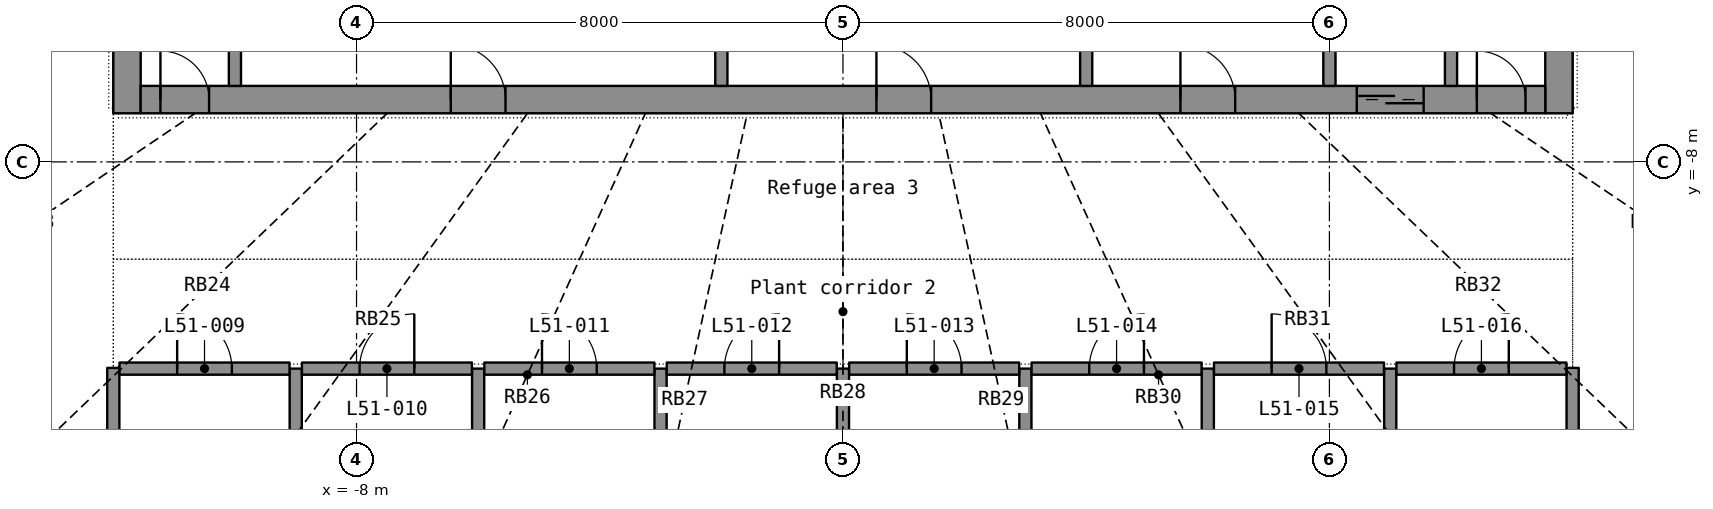
"""IFC4 building model, lengths in metres.
Left out: names, types, materials, properties, quantities, classifications, styles, units other than length and angle.
Written with IfcOpenShell. Run it as: python <this file> out.ifc"""

import sys

from ifc_helpers import new_model, si_unit, direction, frame, frame_2d, origin, place, context, subcontext, project, spatial, rectangle, extrude, element, fill, save


model = new_model("IFC4")
c1 = context("Model", 3, precision=1e-05, world=origin(), true_north=direction((0.0, 1.0)))
c2 = subcontext(c1, "Body", "Model", "MODEL_VIEW")
j1 = project(units=[si_unit("LENGTHUNIT", "METRE"), si_unit("PLANEANGLEUNIT", "RADIAN")], contexts=[c1])
p1 = place(None, origin())
s1 = spatial("IfcSite", under=j1, at=p1, CompositionType="ELEMENT")
p2 = place(p1, origin())
s2 = spatial("IfcBuilding", under=s1, at=p2, CompositionType="ELEMENT")
p3 = place(p2, frame((0.0, 0.0, 212.6)))
s3 = spatial("IfcBuildingStorey", under=s2, at=p3, CompositionType="ELEMENT", Elevation=212.6)
p4 = place(p3, frame((-11.775, -7.2, 0.0), z_axis=(0.0, 0.0, 1.0), x_axis=(0.0, 1.0, 0.0)))
e1 = element("IfcWall", 1, at=p4, inside=s3, PredefinedType="SHEAR", context=c2, shape_type="SweptSolid", body=[
    extrude(rectangle(XDim=14.4, YDim=0.45, at=frame_2d((7.2, 0.0))), origin(), (0.0, 0.0, 1.0), 4.1),
])
p5 = place(p4, frame((6.5, 0.0, 0.0)))
e2 = element("IfcOpeningElement", 2, at=p5, cuts=e1, PredefinedType="OPENING", context=c2, shape_type="SweptSolid", body=[
    extrude(rectangle(XDim=1.4, YDim=2.2, at=frame_2d((0.7, 1.1))), frame((0.0, 0.235, 0.0), z_axis=(0.0, -1.0, 0.0), x_axis=(1.0, 0.0, 0.0)), (0.0, 0.0, 1.0), 0.47),
])
p6 = place(p3, frame((11.775, -7.2, 0.0), z_axis=(0.0, 0.0, 1.0), x_axis=(0.0, 1.0, 0.0)))
e3 = element("IfcWall", 3, at=p6, inside=s3, PredefinedType="SHEAR", context=c2, shape_type="SweptSolid", body=[
    extrude(rectangle(XDim=14.4, YDim=0.45, at=frame_2d((7.2, 0.0))), origin(), (0.0, 0.0, 1.0), 4.1),
])
p7 = place(p6, frame((6.5, 0.0, 0.0)))
e4 = element("IfcOpeningElement", 4, at=p7, cuts=e3, PredefinedType="OPENING", context=c2, shape_type="SweptSolid", body=[
    extrude(rectangle(XDim=1.4, YDim=2.2, at=frame_2d((0.7, 1.1))), frame((0.0, 0.235, 0.0), z_axis=(0.0, -1.0, 0.0), x_axis=(1.0, 0.0, 0.0)), (0.0, 0.0, 1.0), 0.47),
])
p8 = place(p3, frame((-11.55, -6.975, 0.0), z_axis=(0.0, 0.0, 1.0), x_axis=(1.0, 0.0, 0.0)))
e5 = element("IfcWall", 5, at=p8, inside=s3, PredefinedType="SHEAR", context=c2, shape_type="SweptSolid", body=[
    extrude(rectangle(XDim=23.1, YDim=0.45, at=frame_2d((11.55, 0.0))), origin(), (0.0, 0.0, 1.0), 4.1),
])
p9 = place(p8, frame((20.0, 0.0, 0.0)))
e6 = element("IfcOpeningElement", 6, at=p9, cuts=e5, PredefinedType="OPENING", context=c2, shape_type="SweptSolid", body=[
    extrude(rectangle(XDim=1.1, YDim=2.2, at=frame_2d((0.55, 1.1))), frame((0.0, 0.235, 0.0), z_axis=(0.0, -1.0, 0.0), x_axis=(1.0, 0.0, 0.0)), (0.0, 0.0, 1.0), 0.47),
])
p10 = place(p8, frame((5.1, 0.0, 0.0)))
e7 = element("IfcOpeningElement", 7, at=p10, cuts=e5, PredefinedType="OPENING", context=c2, shape_type="SweptSolid", body=[
    extrude(rectangle(XDim=0.9, YDim=2.1, at=frame_2d((0.45, 1.05))), frame((0.0, 0.235, 0.0), z_axis=(0.0, -1.0, 0.0), x_axis=(1.0, 0.0, 0.0)), (0.0, 0.0, 1.0), 0.47),
])
p11 = place(p8, frame((12.1, 0.0, 0.0)))
e8 = element("IfcOpeningElement", 8, at=p11, cuts=e5, PredefinedType="OPENING", context=c2, shape_type="SweptSolid", body=[
    extrude(rectangle(XDim=0.9, YDim=2.1, at=frame_2d((0.45, 1.05))), frame((0.0, 0.235, 0.0), z_axis=(0.0, -1.0, 0.0), x_axis=(1.0, 0.0, 0.0)), (0.0, 0.0, 1.0), 0.47),
])
p12 = place(p8, frame((17.1, 0.0, 0.0)))
e9 = element("IfcOpeningElement", 9, at=p12, cuts=e5, PredefinedType="OPENING", context=c2, shape_type="SweptSolid", body=[
    extrude(rectangle(XDim=0.9, YDim=2.1, at=frame_2d((0.45, 1.05))), frame((0.0, 0.235, 0.0), z_axis=(0.0, -1.0, 0.0), x_axis=(1.0, 0.0, 0.0)), (0.0, 0.0, 1.0), 0.47),
])
p13 = place(p8, frame((0.325, 0.0, 0.0)))
e10 = element("IfcOpeningElement", 10, at=p13, cuts=e5, PredefinedType="OPENING", context=c2, shape_type="SweptSolid", body=[
    extrude(rectangle(XDim=0.8, YDim=2.05, at=frame_2d((0.4, 1.025))), frame((0.0, 0.235, 0.0), z_axis=(0.0, -1.0, 0.0), x_axis=(1.0, 0.0, 0.0)), (0.0, 0.0, 1.0), 0.47),
])
p14 = place(p8, frame((21.975, 0.0, 0.0)))
e11 = element("IfcOpeningElement", 11, at=p14, cuts=e5, PredefinedType="OPENING", context=c2, shape_type="SweptSolid", body=[
    extrude(rectangle(XDim=0.8, YDim=2.05, at=frame_2d((0.4, 1.025))), frame((0.0, 0.235, 0.0), z_axis=(0.0, -1.0, 0.0), x_axis=(1.0, 0.0, 0.0)), (0.0, 0.0, 1.0), 0.47),
])
for number, where, z_axis, x_axis in (
    (12, (-10.0, -6.75, 0.0), (0.0, 0.0, 1.0), (0.0, 1.0, 0.0)),
    (13, (8.0, -6.75, 0.0), (0.0, 0.0, 1.0), (0.0, 1.0, 0.0)),
    (14, (10.0, -6.75, 0.0), (0.0, 0.0, 1.0), (0.0, 1.0, 0.0)),
):
    element("IfcWall", number, at=place(p3, frame(where, z_axis=z_axis, x_axis=x_axis)), inside=s3, PredefinedType="SHEAR", context=c2, shape_type="SweptSolid", body=[
        extrude(rectangle(XDim=2.85, YDim=0.2, at=frame_2d((1.425, 0.0))), origin(), (0.0, 0.0, 1.0), 4.1),
    ])
for number, where, z_axis, x_axis in (
    (15, (-2.0, -6.75, 0.0), (0.0, 0.0, 1.0), (0.0, 1.0, 0.0)),
    (16, (4.0, -6.75, 0.0), (0.0, 0.0, 1.0), (0.0, 1.0, 0.0)),
):
    element("IfcWall", number, at=place(p3, frame(where, z_axis=z_axis, x_axis=x_axis)), inside=s3, PredefinedType="PARTITIONING", context=c2, shape_type="SweptSolid", body=[
        extrude(rectangle(XDim=2.85, YDim=0.2, at=frame_2d((1.425, 0.0))), origin(), (0.0, 0.0, 1.0), 4.1),
    ])
p15 = place(p3, frame((0.0, -18.107, 0.0), z_axis=(0.0, 0.0, 1.0), x_axis=(0.0, 1.0, 0.0)))
e17 = element("IfcWall", 17, at=p15, inside=s3, PredefinedType="PARTITIONING", context=c2, shape_type="SweptSolid", body=[
    extrude(rectangle(XDim=6.708, YDim=0.2, at=frame_2d((3.354, 0.0))), origin(), (0.0, 0.0, 1.0), 3.3),
])
for number, where, z_axis, x_axis in (
    (18, (-3.0, -17.784, 0.0), (0.0, 0.0, 1.0), (0.0, 1.0, 0.0)),
    (19, (3.0, -17.784, 0.0), (0.0, 0.0, 1.0), (0.0, 1.0, 0.0)),
):
    element("IfcWall", number, at=place(p3, frame(where, z_axis=z_axis, x_axis=x_axis)), inside=s3, PredefinedType="PARTITIONING", context=c2, shape_type="SweptSolid", body=[
        extrude(rectangle(XDim=6.384, YDim=0.2, at=frame_2d((3.192, 0.0))), origin(), (0.0, 0.0, 1.0), 3.3),
    ])
for number, where, z_axis, x_axis in (
    (20, (-6.0, -17.398, 0.0), (0.0, 0.0, 1.0), (0.0, 1.0, 0.0)),
    (21, (6.0, -17.398, 0.0), (0.0, 0.0, 1.0), (0.0, 1.0, 0.0)),
):
    element("IfcWall", number, at=place(p3, frame(where, z_axis=z_axis, x_axis=x_axis)), inside=s3, PredefinedType="PARTITIONING", context=c2, shape_type="SweptSolid", body=[
        extrude(rectangle(XDim=5.999, YDim=0.2, at=frame_2d((2.999, 0.0))), origin(), (0.0, 0.0, 1.0), 3.3),
    ])
for number, where, z_axis, x_axis in (
    (22, (-9.0, -16.381, 0.0), (0.0, 0.0, 1.0), (0.0, 1.0, 0.0)),
    (23, (9.0, -16.381, 0.0), (0.0, 0.0, 1.0), (0.0, 1.0, 0.0)),
):
    element("IfcWall", number, at=place(p3, frame(where, z_axis=z_axis, x_axis=x_axis)), inside=s3, PredefinedType="PARTITIONING", context=c2, shape_type="SweptSolid", body=[
        extrude(rectangle(XDim=4.981, YDim=0.2, at=frame_2d((2.49, 0.0))), origin(), (0.0, 0.0, 1.0), 3.3),
    ])
for number, where, z_axis, x_axis in (
    (24, (-12.0, -11.388, 0.0), (0.0, 0.0, 1.0), (0.0, -1.0, 0.0)),
    (25, (12.0, -15.095, 0.0), (0.0, 0.0, 1.0), (0.0, 1.0, 0.0)),
):
    element("IfcWall", number, at=place(p3, frame(where, z_axis=z_axis, x_axis=x_axis)), inside=s3, PredefinedType="PARTITIONING", context=c2, shape_type="SweptSolid", body=[
        extrude(rectangle(XDim=3.707, YDim=0.2, at=frame_2d((1.854, 0.0))), origin(), (0.0, 0.0, 1.0), 3.3),
    ])
p16 = place(p3, frame((-11.898, -11.4, 0.0), z_axis=(0.0, 0.0, 1.0), x_axis=(1.0, 0.0, 0.0)))
e26 = element("IfcWall", 26, at=p16, inside=s3, PredefinedType="PARTITIONING", context=c2, shape_type="SweptSolid", body=[
    extrude(rectangle(XDim=2.796, YDim=0.2, at=frame_2d((1.398, 0.0))), origin(), (0.0, 0.0, 1.0), 3.3),
])
p17 = place(p16, frame((0.948, 0.0, 0.0)))
e27 = element("IfcOpeningElement", 27, at=p17, cuts=e26, PredefinedType="OPENING", context=c2, shape_type="SweptSolid", body=[
    extrude(rectangle(XDim=0.9, YDim=2.1, at=frame_2d((0.45, 1.05))), frame((0.0, 0.11, 0.0), z_axis=(0.0, -1.0, 0.0), x_axis=(1.0, 0.0, 0.0)), (0.0, 0.0, 1.0), 0.22),
])
p18 = place(p3, frame((-8.898, -11.4, 0.0), z_axis=(0.0, 0.0, 1.0), x_axis=(1.0, 0.0, 0.0)))
e28 = element("IfcWall", 28, at=p18, inside=s3, PredefinedType="PARTITIONING", context=c2, shape_type="SweptSolid", body=[
    extrude(rectangle(XDim=2.796, YDim=0.2, at=frame_2d((1.398, 0.0))), origin(), (0.0, 0.0, 1.0), 3.3),
])
p19 = place(p18, frame((0.948, 0.0, 0.0)))
e29 = element("IfcOpeningElement", 29, at=p19, cuts=e28, PredefinedType="OPENING", context=c2, shape_type="SweptSolid", body=[
    extrude(rectangle(XDim=0.9, YDim=2.1, at=frame_2d((0.45, 1.05))), frame((0.0, 0.11, 0.0), z_axis=(0.0, -1.0, 0.0), x_axis=(1.0, 0.0, 0.0)), (0.0, 0.0, 1.0), 0.22),
])
p20 = place(p3, frame((-5.898, -11.4, 0.0), z_axis=(0.0, 0.0, 1.0), x_axis=(1.0, 0.0, 0.0)))
e30 = element("IfcWall", 30, at=p20, inside=s3, PredefinedType="PARTITIONING", context=c2, shape_type="SweptSolid", body=[
    extrude(rectangle(XDim=2.796, YDim=0.2, at=frame_2d((1.398, 0.0))), origin(), (0.0, 0.0, 1.0), 3.3),
])
p21 = place(p20, frame((0.948, 0.0, 0.0)))
e31 = element("IfcOpeningElement", 31, at=p21, cuts=e30, PredefinedType="OPENING", context=c2, shape_type="SweptSolid", body=[
    extrude(rectangle(XDim=0.9, YDim=2.1, at=frame_2d((0.45, 1.05))), frame((0.0, 0.11, 0.0), z_axis=(0.0, -1.0, 0.0), x_axis=(1.0, 0.0, 0.0)), (0.0, 0.0, 1.0), 0.22),
])
p22 = place(p3, frame((-2.898, -11.4, 0.0), z_axis=(0.0, 0.0, 1.0), x_axis=(1.0, 0.0, 0.0)))
e32 = element("IfcWall", 32, at=p22, inside=s3, PredefinedType="PARTITIONING", context=c2, shape_type="SweptSolid", body=[
    extrude(rectangle(XDim=2.796, YDim=0.2, at=frame_2d((1.398, 0.0))), origin(), (0.0, 0.0, 1.0), 3.3),
])
p23 = place(p22, frame((0.948, 0.0, 0.0)))
e33 = element("IfcOpeningElement", 33, at=p23, cuts=e32, PredefinedType="OPENING", context=c2, shape_type="SweptSolid", body=[
    extrude(rectangle(XDim=0.9, YDim=2.1, at=frame_2d((0.45, 1.05))), frame((0.0, 0.11, 0.0), z_axis=(0.0, -1.0, 0.0), x_axis=(1.0, 0.0, 0.0)), (0.0, 0.0, 1.0), 0.22),
])
p24 = place(p3, frame((0.102, -11.4, 0.0), z_axis=(0.0, 0.0, 1.0), x_axis=(1.0, 0.0, 0.0)))
e34 = element("IfcWall", 34, at=p24, inside=s3, PredefinedType="PARTITIONING", context=c2, shape_type="SweptSolid", body=[
    extrude(rectangle(XDim=2.796, YDim=0.2, at=frame_2d((1.398, 0.0))), origin(), (0.0, 0.0, 1.0), 3.3),
])
p25 = place(p24, frame((0.948, 0.0, 0.0)))
e35 = element("IfcOpeningElement", 35, at=p25, cuts=e34, PredefinedType="OPENING", context=c2, shape_type="SweptSolid", body=[
    extrude(rectangle(XDim=0.9, YDim=2.1, at=frame_2d((0.45, 1.05))), frame((0.0, 0.11, 0.0), z_axis=(0.0, -1.0, 0.0), x_axis=(1.0, 0.0, 0.0)), (0.0, 0.0, 1.0), 0.22),
])
p26 = place(p3, frame((3.102, -11.4, 0.0), z_axis=(0.0, 0.0, 1.0), x_axis=(1.0, 0.0, 0.0)))
e36 = element("IfcWall", 36, at=p26, inside=s3, PredefinedType="PARTITIONING", context=c2, shape_type="SweptSolid", body=[
    extrude(rectangle(XDim=2.796, YDim=0.2, at=frame_2d((1.398, 0.0))), origin(), (0.0, 0.0, 1.0), 3.3),
])
p27 = place(p26, frame((0.948, 0.0, 0.0)))
e37 = element("IfcOpeningElement", 37, at=p27, cuts=e36, PredefinedType="OPENING", context=c2, shape_type="SweptSolid", body=[
    extrude(rectangle(XDim=0.9, YDim=2.1, at=frame_2d((0.45, 1.05))), frame((0.0, 0.11, 0.0), z_axis=(0.0, -1.0, 0.0), x_axis=(1.0, 0.0, 0.0)), (0.0, 0.0, 1.0), 0.22),
])
p28 = place(p3, frame((6.102, -11.4, 0.0), z_axis=(0.0, 0.0, 1.0), x_axis=(1.0, 0.0, 0.0)))
e38 = element("IfcWall", 38, at=p28, inside=s3, PredefinedType="PARTITIONING", context=c2, shape_type="SweptSolid", body=[
    extrude(rectangle(XDim=2.796, YDim=0.2, at=frame_2d((1.398, 0.0))), origin(), (0.0, 0.0, 1.0), 3.3),
])
p29 = place(p28, frame((0.948, 0.0, 0.0)))
e39 = element("IfcOpeningElement", 39, at=p29, cuts=e38, PredefinedType="OPENING", context=c2, shape_type="SweptSolid", body=[
    extrude(rectangle(XDim=0.9, YDim=2.1, at=frame_2d((0.45, 1.05))), frame((0.0, 0.11, 0.0), z_axis=(0.0, -1.0, 0.0), x_axis=(1.0, 0.0, 0.0)), (0.0, 0.0, 1.0), 0.22),
])
p30 = place(p3, frame((9.102, -11.4, 0.0), z_axis=(0.0, 0.0, 1.0), x_axis=(1.0, 0.0, 0.0)))
e40 = element("IfcWall", 40, at=p30, inside=s3, PredefinedType="PARTITIONING", context=c2, shape_type="SweptSolid", body=[
    extrude(rectangle(XDim=2.796, YDim=0.2, at=frame_2d((1.398, 0.0))), origin(), (0.0, 0.0, 1.0), 3.3),
])
p31 = place(p30, frame((0.948, 0.0, 0.0)))
e41 = element("IfcOpeningElement", 41, at=p31, cuts=e40, PredefinedType="OPENING", context=c2, shape_type="SweptSolid", body=[
    extrude(rectangle(XDim=0.9, YDim=2.1, at=frame_2d((0.45, 1.05))), frame((0.0, 0.11, 0.0), z_axis=(0.0, -1.0, 0.0), x_axis=(1.0, 0.0, 0.0)), (0.0, 0.0, 1.0), 0.22),
])
p32 = place(p9, origin())
e42 = element("IfcDoor", 42, at=p32, inside=s3, OperationType="DOUBLE_DOOR_SLIDING", PredefinedType="DOOR", context=c2, shape_type="SweptSolid", body=[
    extrude(rectangle(XDim=1.1, YDim=2.2, at=frame_2d((0.55, 1.1))), frame((0.0, 0.025, 0.0), z_axis=(0.0, -1.0, 0.0), x_axis=(1.0, 0.0, 0.0)), (0.0, 0.0, 1.0), 0.05),
])
fill(e6, e42)
p33 = place(p10, origin())
e43 = element("IfcDoor", 43, at=p33, inside=s3, OperationType="SINGLE_SWING_LEFT", PredefinedType="DOOR", context=c2, shape_type="SweptSolid", body=[
    extrude(rectangle(XDim=0.9, YDim=2.1, at=frame_2d((0.45, 1.05))), frame((0.0, 0.025, 0.0), z_axis=(0.0, -1.0, 0.0), x_axis=(1.0, 0.0, 0.0)), (0.0, 0.0, 1.0), 0.05),
])
fill(e7, e43)
p34 = place(p11, origin())
e44 = element("IfcDoor", 44, at=p34, inside=s3, OperationType="SINGLE_SWING_LEFT", PredefinedType="DOOR", context=c2, shape_type="SweptSolid", body=[
    extrude(rectangle(XDim=0.9, YDim=2.1, at=frame_2d((0.45, 1.05))), frame((0.0, 0.025, 0.0), z_axis=(0.0, -1.0, 0.0), x_axis=(1.0, 0.0, 0.0)), (0.0, 0.0, 1.0), 0.05),
])
fill(e8, e44)
p35 = place(p12, origin())
e45 = element("IfcDoor", 45, at=p35, inside=s3, OperationType="SINGLE_SWING_LEFT", PredefinedType="DOOR", context=c2, shape_type="SweptSolid", body=[
    extrude(rectangle(XDim=0.9, YDim=2.1, at=frame_2d((0.45, 1.05))), frame((0.0, 0.025, 0.0), z_axis=(0.0, -1.0, 0.0), x_axis=(1.0, 0.0, 0.0)), (0.0, 0.0, 1.0), 0.05),
])
fill(e9, e45)
p36 = place(p13, origin())
e46 = element("IfcDoor", 46, at=p36, inside=s3, OperationType="SINGLE_SWING_LEFT", PredefinedType="DOOR", context=c2, shape_type="SweptSolid", body=[
    extrude(rectangle(XDim=0.8, YDim=2.05, at=frame_2d((0.4, 1.025))), frame((0.0, 0.025, 0.0), z_axis=(0.0, -1.0, 0.0), x_axis=(1.0, 0.0, 0.0)), (0.0, 0.0, 1.0), 0.05),
])
fill(e10, e46)
p37 = place(p14, origin())
e47 = element("IfcDoor", 47, at=p37, inside=s3, OperationType="SINGLE_SWING_LEFT", PredefinedType="DOOR", context=c2, shape_type="SweptSolid", body=[
    extrude(rectangle(XDim=0.8, YDim=2.05, at=frame_2d((0.4, 1.025))), frame((0.0, 0.025, 0.0), z_axis=(0.0, -1.0, 0.0), x_axis=(1.0, 0.0, 0.0)), (0.0, 0.0, 1.0), 0.05),
])
fill(e11, e47)
p38 = place(p17, origin())
e48 = element("IfcDoor", 48, at=p38, inside=s3, OperationType="SINGLE_SWING_LEFT", PredefinedType="DOOR", context=c2, shape_type="SweptSolid", body=[
    extrude(rectangle(XDim=0.9, YDim=2.1, at=frame_2d((0.45, 1.05))), frame((0.0, 0.025, 0.0), z_axis=(0.0, -1.0, 0.0), x_axis=(1.0, 0.0, 0.0)), (0.0, 0.0, 1.0), 0.05),
])
fill(e27, e48)
p39 = place(p19, origin())
e49 = element("IfcDoor", 49, at=p39, inside=s3, OperationType="SINGLE_SWING_RIGHT", PredefinedType="DOOR", context=c2, shape_type="SweptSolid", body=[
    extrude(rectangle(XDim=0.9, YDim=2.1, at=frame_2d((0.45, 1.05))), frame((0.0, 0.025, 0.0), z_axis=(0.0, -1.0, 0.0), x_axis=(1.0, 0.0, 0.0)), (0.0, 0.0, 1.0), 0.05),
])
fill(e29, e49)
p40 = place(p21, origin())
e50 = element("IfcDoor", 50, at=p40, inside=s3, OperationType="SINGLE_SWING_LEFT", PredefinedType="DOOR", context=c2, shape_type="SweptSolid", body=[
    extrude(rectangle(XDim=0.9, YDim=2.1, at=frame_2d((0.45, 1.05))), frame((0.0, 0.025, 0.0), z_axis=(0.0, -1.0, 0.0), x_axis=(1.0, 0.0, 0.0)), (0.0, 0.0, 1.0), 0.05),
])
fill(e31, e50)
p41 = place(p23, origin())
e51 = element("IfcDoor", 51, at=p41, inside=s3, OperationType="SINGLE_SWING_RIGHT", PredefinedType="DOOR", context=c2, shape_type="SweptSolid", body=[
    extrude(rectangle(XDim=0.9, YDim=2.1, at=frame_2d((0.45, 1.05))), frame((0.0, 0.025, 0.0), z_axis=(0.0, -1.0, 0.0), x_axis=(1.0, 0.0, 0.0)), (0.0, 0.0, 1.0), 0.05),
])
fill(e33, e51)
p42 = place(p25, origin())
e52 = element("IfcDoor", 52, at=p42, inside=s3, OperationType="SINGLE_SWING_LEFT", PredefinedType="DOOR", context=c2, shape_type="SweptSolid", body=[
    extrude(rectangle(XDim=0.9, YDim=2.1, at=frame_2d((0.45, 1.05))), frame((0.0, 0.025, 0.0), z_axis=(0.0, -1.0, 0.0), x_axis=(1.0, 0.0, 0.0)), (0.0, 0.0, 1.0), 0.05),
])
fill(e35, e52)
p43 = place(p27, origin())
e53 = element("IfcDoor", 53, at=p43, inside=s3, OperationType="SINGLE_SWING_RIGHT", PredefinedType="DOOR", context=c2, shape_type="SweptSolid", body=[
    extrude(rectangle(XDim=0.9, YDim=2.1, at=frame_2d((0.45, 1.05))), frame((0.0, 0.025, 0.0), z_axis=(0.0, -1.0, 0.0), x_axis=(1.0, 0.0, 0.0)), (0.0, 0.0, 1.0), 0.05),
])
fill(e37, e53)
p44 = place(p29, origin())
e54 = element("IfcDoor", 54, at=p44, inside=s3, OperationType="SINGLE_SWING_LEFT", PredefinedType="DOOR", context=c2, shape_type="SweptSolid", body=[
    extrude(rectangle(XDim=0.9, YDim=2.1, at=frame_2d((0.45, 1.05))), frame((0.0, 0.025, 0.0), z_axis=(0.0, -1.0, 0.0), x_axis=(1.0, 0.0, 0.0)), (0.0, 0.0, 1.0), 0.05),
])
fill(e39, e54)
p45 = place(p31, origin())
e55 = element("IfcDoor", 55, at=p45, inside=s3, OperationType="SINGLE_SWING_RIGHT", PredefinedType="DOOR", context=c2, shape_type="SweptSolid", body=[
    extrude(rectangle(XDim=0.9, YDim=2.1, at=frame_2d((0.45, 1.05))), frame((0.0, 0.025, 0.0), z_axis=(0.0, -1.0, 0.0), x_axis=(1.0, 0.0, 0.0)), (0.0, 0.0, 1.0), 0.05),
])
fill(e41, e55)
save(model, sys.argv[1])
